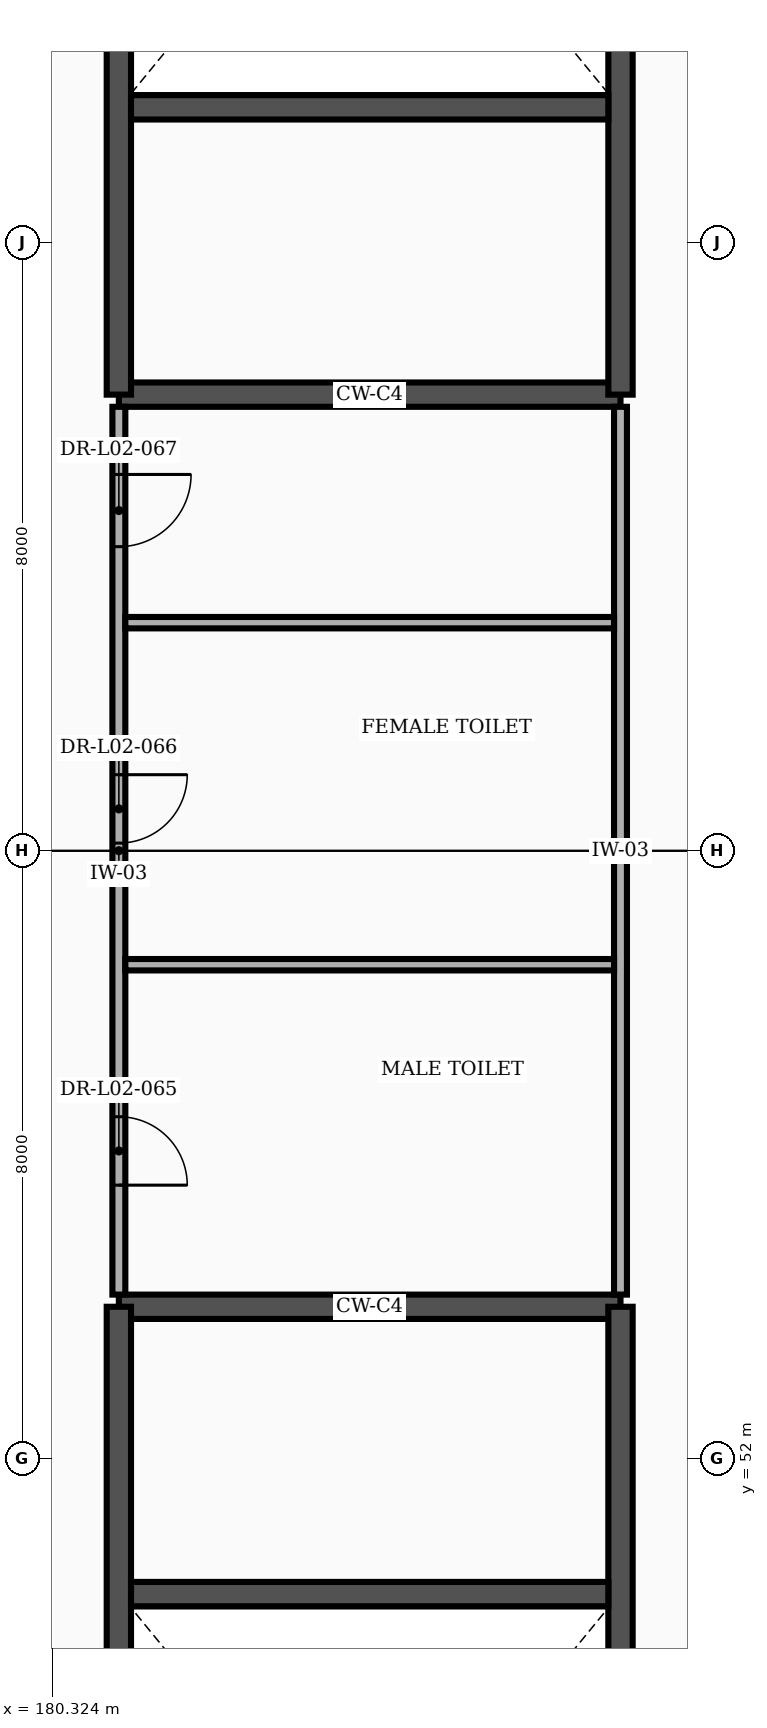
"""IFC4 building model, lengths in metres.
Left out: names, types, materials, properties, quantities, classifications, styles, units other than length and angle.
Written with IfcOpenShell. Run it as: python <this file> out.ifc"""

import sys

from ifc_helpers import new_model, si_unit, direction, frame, frame_2d, origin, place, context, subcontext, project, spatial, rectangle, extrude, element, fill, save


model = new_model("IFC4")
c1 = context("Model", 3, precision=1e-05, world=origin(), true_north=direction((0.0, 1.0)))
c2 = subcontext(c1, "Body", "Model", "MODEL_VIEW")
j1 = project(units=[si_unit("LENGTHUNIT", "METRE"), si_unit("PLANEANGLEUNIT", "RADIAN")], contexts=[c1])
p1 = place(None, origin())
s1 = spatial("IfcSite", under=j1, at=p1, CompositionType="ELEMENT")
p2 = place(p1, origin())
s2 = spatial("IfcBuilding", under=s1, at=p2, CompositionType="ELEMENT")
p3 = place(p2, frame((0.0, 0.0, 11.4)))
s3 = spatial("IfcBuildingStorey", under=s2, at=p3, CompositionType="ELEMENT", Elevation=11.4)
p4 = place(p3, frame((181.2, 54.0, 0.0), z_axis=(0.0, 0.0, 1.0), x_axis=(1.0, 0.0, 0.0)))
e1 = element("IfcWall", 1, at=p4, inside=s3, PredefinedType="SHEAR", context=c2, shape_type="SweptSolid", body=[
    extrude(rectangle(XDim=6.6, YDim=0.32, at=frame_2d((3.3, 0.0))), origin(), (0.0, 0.0, 1.0), 5.15),
])
p5 = place(p3, frame((181.2, 39.4, 0.0), z_axis=(0.0, 0.0, 1.0), x_axis=(0.0, 1.0, 0.0)))
e2 = element("IfcWall", 2, at=p5, inside=s3, PredefinedType="SHEAR", context=c2, shape_type="SweptSolid", body=[
    extrude(rectangle(XDim=14.6, YDim=0.32, at=frame_2d((7.3, 0.0))), origin(), (0.0, 0.0, 1.0), 5.15),
])
p6 = place(p5, frame((0.55, 0.0, 0.0)))
e3 = element("IfcOpeningElement", 3, at=p6, cuts=e2, PredefinedType="OPENING", context=c2, shape_type="SweptSolid", body=[
    extrude(rectangle(XDim=2.4, YDim=2.25, at=frame_2d((1.2, 1.125))), frame((0.0, 0.172, 0.0), z_axis=(0.0, -1.0, 0.0), x_axis=(1.0, 0.0, 0.0)), (0.0, 0.0, 1.0), 0.344),
])
p7 = place(p3, frame((187.8, 39.4, 0.0), z_axis=(0.0, 0.0, 1.0), x_axis=(0.0, 1.0, 0.0)))
e4 = element("IfcWall", 4, at=p7, inside=s3, PredefinedType="SHEAR", context=c2, shape_type="SweptSolid", body=[
    extrude(rectangle(XDim=14.6, YDim=0.32, at=frame_2d((7.3, 0.0))), origin(), (0.0, 0.0, 1.0), 5.15),
])
p8 = place(p3, frame((181.36, 50.22, 0.0), z_axis=(0.0, 0.0, 1.0), x_axis=(1.0, 0.0, 0.0)))
e5 = element("IfcWall", 5, at=p8, inside=s3, PredefinedType="SHEAR", context=c2, shape_type="SweptSolid", body=[
    extrude(rectangle(XDim=6.28, YDim=0.32, at=frame_2d((3.14, 0.0))), origin(), (0.0, 0.0, 1.0), 5.15),
])
p9 = place(p3, frame((181.2, 66.0, 0.0), z_axis=(0.0, 0.0, 1.0), x_axis=(1.0, 0.0, 0.0)))
e6 = element("IfcWall", 6, at=p9, inside=s3, PredefinedType="SHEAR", context=c2, shape_type="SweptSolid", body=[
    extrude(rectangle(XDim=6.6, YDim=0.32, at=frame_2d((3.3, 0.0))), origin(), (0.0, 0.0, 1.0), 5.15),
])
p10 = place(p3, frame((181.2, 66.0, 0.0), z_axis=(0.0, 0.0, 1.0), x_axis=(0.0, 1.0, 0.0)))
e7 = element("IfcWall", 7, at=p10, inside=s3, PredefinedType="SHEAR", context=c2, shape_type="SweptSolid", body=[
    extrude(rectangle(XDim=14.6, YDim=0.32, at=frame_2d((7.3, 0.0))), origin(), (0.0, 0.0, 1.0), 5.15),
])
p11 = place(p10, frame((11.65, 0.0, 0.0)))
e8 = element("IfcOpeningElement", 8, at=p11, cuts=e7, PredefinedType="OPENING", context=c2, shape_type="SweptSolid", body=[
    extrude(rectangle(XDim=2.4, YDim=2.25, at=frame_2d((1.2, 1.125))), frame((0.0, 0.172, 0.0), z_axis=(0.0, -1.0, 0.0), x_axis=(1.0, 0.0, 0.0)), (0.0, 0.0, 1.0), 0.344),
])
p12 = place(p3, frame((187.8, 66.0, 0.0), z_axis=(0.0, 0.0, 1.0), x_axis=(0.0, 1.0, 0.0)))
e9 = element("IfcWall", 9, at=p12, inside=s3, PredefinedType="SHEAR", context=c2, shape_type="SweptSolid", body=[
    extrude(rectangle(XDim=14.6, YDim=0.32, at=frame_2d((7.3, 0.0))), origin(), (0.0, 0.0, 1.0), 5.15),
])
p13 = place(p3, frame((181.36, 69.78, 0.0), z_axis=(0.0, 0.0, 1.0), x_axis=(1.0, 0.0, 0.0)))
e10 = element("IfcWall", 10, at=p13, inside=s3, PredefinedType="SHEAR", context=c2, shape_type="SweptSolid", body=[
    extrude(rectangle(XDim=6.28, YDim=0.32, at=frame_2d((3.14, 0.0))), origin(), (0.0, 0.0, 1.0), 5.15),
])
p14 = place(p3, frame((187.8, 54.16, 0.0), z_axis=(0.0, 0.0, 1.0), x_axis=(0.0, 1.0, 0.0)))
e11 = element("IfcWall", 11, at=p14, inside=s3, PredefinedType="PARTITIONING", context=c2, shape_type="SweptSolid", body=[
    extrude(rectangle(XDim=11.68, YDim=0.17, at=frame_2d((5.84, 0.0))), origin(), (0.0, 0.0, 1.0), 5.15),
])
p15 = place(p3, frame((181.2, 54.16, 0.0), z_axis=(0.0, 0.0, 1.0), x_axis=(0.0, 1.0, 0.0)))
e12 = element("IfcWall", 12, at=p15, inside=s3, PredefinedType="PARTITIONING", context=c2, shape_type="SweptSolid", body=[
    extrude(rectangle(XDim=11.68, YDim=0.17, at=frame_2d((5.84, 0.0))), origin(), (0.0, 0.0, 1.0), 5.15),
])
p16 = place(p15, frame((1.44, 0.0, 0.0)))
e13 = element("IfcOpeningElement", 13, at=p16, cuts=e12, PredefinedType="OPENING", context=c2, shape_type="SweptSolid", body=[
    extrude(rectangle(XDim=0.9, YDim=2.1, at=frame_2d((0.45, 1.05))), frame((0.0, 0.097, 0.0), z_axis=(0.0, -1.0, 0.0), x_axis=(1.0, 0.0, 0.0)), (0.0, 0.0, 1.0), 0.194),
])
p17 = place(p15, frame((5.94, 0.0, 0.0)))
e14 = element("IfcOpeningElement", 14, at=p17, cuts=e12, PredefinedType="OPENING", context=c2, shape_type="SweptSolid", body=[
    extrude(rectangle(XDim=0.9, YDim=2.1, at=frame_2d((0.45, 1.05))), frame((0.0, 0.097, 0.0), z_axis=(0.0, -1.0, 0.0), x_axis=(1.0, 0.0, 0.0)), (0.0, 0.0, 1.0), 0.194),
])
p18 = place(p15, frame((9.84, 0.0, 0.0)))
e15 = element("IfcOpeningElement", 15, at=p18, cuts=e12, PredefinedType="OPENING", context=c2, shape_type="SweptSolid", body=[
    extrude(rectangle(XDim=0.95, YDim=2.1, at=frame_2d((0.475, 1.05))), frame((0.0, 0.097, 0.0), z_axis=(0.0, -1.0, 0.0), x_axis=(1.0, 0.0, 0.0)), (0.0, 0.0, 1.0), 0.194),
])
for number, where, z_axis, x_axis in (
    (16, (181.285, 58.5, 0.0), (0.0, 0.0, 1.0), (1.0, 0.0, 0.0)),
    (17, (181.285, 63.0, 0.0), (0.0, 0.0, 1.0), (1.0, 0.0, 0.0)),
):
    element("IfcWall", number, at=place(p3, frame(where, z_axis=z_axis, x_axis=x_axis)), inside=s3, PredefinedType="PARTITIONING", context=c2, shape_type="SweptSolid", body=[
        extrude(rectangle(XDim=6.43, YDim=0.15, at=frame_2d((3.215, 0.0))), origin(), (0.0, 0.0, 1.0), 5.15),
    ])
p19 = place(p16, frame((0.9, 0.0, 0.0), z_axis=(0.0, 0.0, 1.0), x_axis=(-1.0, 0.0, 0.0)))
e18 = element("IfcDoor", 18, at=p19, inside=s3, OperationType="SINGLE_SWING_RIGHT", PredefinedType="DOOR", context=c2, shape_type="SweptSolid", body=[
    extrude(rectangle(XDim=0.9, YDim=2.1, at=frame_2d((0.45, 1.05))), frame((0.0, 0.025, 0.0), z_axis=(0.0, -1.0, 0.0), x_axis=(1.0, 0.0, 0.0)), (0.0, 0.0, 1.0), 0.05),
])
fill(e13, e18)
p20 = place(p17, frame((0.9, 0.0, 0.0), z_axis=(0.0, 0.0, 1.0), x_axis=(-1.0, 0.0, 0.0)))
e19 = element("IfcDoor", 19, at=p20, inside=s3, OperationType="SINGLE_SWING_LEFT", PredefinedType="DOOR", context=c2, shape_type="SweptSolid", body=[
    extrude(rectangle(XDim=0.9, YDim=2.1, at=frame_2d((0.45, 1.05))), frame((0.0, 0.025, 0.0), z_axis=(0.0, -1.0, 0.0), x_axis=(1.0, 0.0, 0.0)), (0.0, 0.0, 1.0), 0.05),
])
fill(e14, e19)
p21 = place(p18, frame((0.95, 0.0, 0.0), z_axis=(0.0, 0.0, 1.0), x_axis=(-1.0, 0.0, 0.0)))
e20 = element("IfcDoor", 20, at=p21, inside=s3, OperationType="SINGLE_SWING_LEFT", PredefinedType="DOOR", context=c2, shape_type="SweptSolid", body=[
    extrude(rectangle(XDim=0.95, YDim=2.1, at=frame_2d((0.475, 1.05))), frame((0.0, 0.025, 0.0), z_axis=(0.0, -1.0, 0.0), x_axis=(1.0, 0.0, 0.0)), (0.0, 0.0, 1.0), 0.05),
])
fill(e15, e20)
save(model, sys.argv[1])
